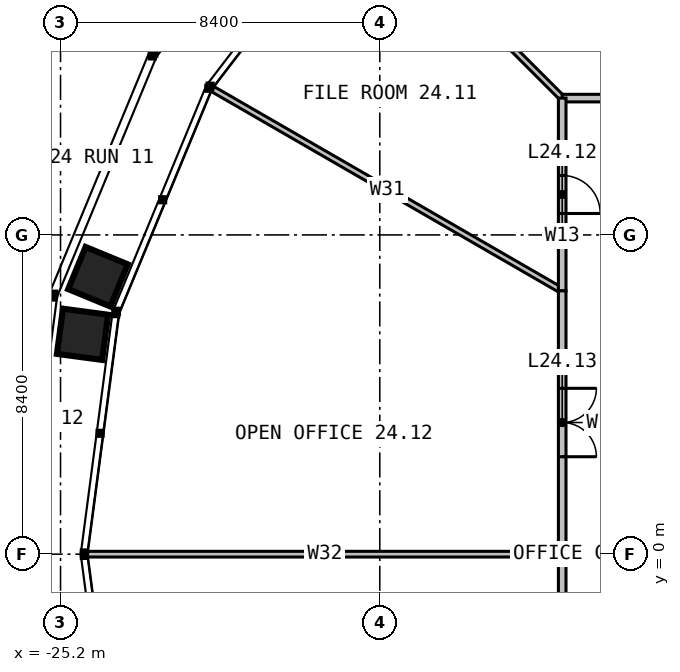
"""IFC4 building model, lengths in metres.
Left out: names, types, materials, properties, quantities, classifications, styles, units other than length and angle.
Written with IfcOpenShell. Run it as: python <this file> out.ifc"""

import sys

from ifc_helpers import new_model, si_unit, direction, frame, frame_2d, origin, place, context, subcontext, project, spatial, rectangle, extrude, element, fill, save


model = new_model("IFC4")
c1 = context("Model", 3, precision=1e-05, world=origin(), true_north=direction((0.0, 1.0)))
c2 = subcontext(c1, "Body", "Model", "MODEL_VIEW")
j1 = project(units=[si_unit("LENGTHUNIT", "METRE"), si_unit("PLANEANGLEUNIT", "RADIAN")], contexts=[c1])
p1 = place(None, origin())
s1 = spatial("IfcSite", under=j1, at=p1, CompositionType="ELEMENT")
p2 = place(p1, origin())
s2 = spatial("IfcBuilding", under=s1, at=p2, CompositionType="ELEMENT")
p3 = place(p2, frame((0.0, 0.0, 102.0)))
s3 = spatial("IfcBuildingStorey", under=s2, at=p3, CompositionType="ELEMENT", Elevation=102.0)
p4 = place(p3, frame((-6.928, 12.0, 0.0), z_axis=(0.0, 0.0, 1.0), x_axis=(-0.500002090115, 0.866024197053, 0.0)))
e1 = element("IfcWall", 1, at=p4, inside=s3, PredefinedType="PARTITIONING", context=c2, shape_type="SweptSolid", body=[
    extrude(rectangle(XDim=10.631, YDim=0.15, at=frame_2d((5.315, 0.0))), origin(), (0.0, 0.0, 1.0), 2.79),
])
p5 = place(p3, frame((-12.0, 12.0, 0.0), z_axis=(0.0, 0.0, 1.0), x_axis=(-0.707106781187, 0.707106781187, 0.0)))
e2 = element("IfcWall", 2, at=p5, inside=s3, PredefinedType="PARTITIONING", context=c2, shape_type="SweptSolid", body=[
    extrude(rectangle(XDim=7.517, YDim=0.15, at=frame_2d((3.758, 0.0))), origin(), (0.0, 0.0, 1.0), 2.79),
])
p6 = place(p3, frame((-12.0, 6.928, 0.0), z_axis=(0.0, 0.0, 1.0), x_axis=(-0.866024197053, 0.500002090115, 0.0)))
e3 = element("IfcWall", 3, at=p6, inside=s3, PredefinedType="PARTITIONING", context=c2, shape_type="SweptSolid", body=[
    extrude(rectangle(XDim=10.631, YDim=0.15, at=frame_2d((5.315, 0.0))), origin(), (0.0, 0.0, 1.0), 2.79),
])
p7 = place(p3, frame((-12.0, 0.0, 0.0), z_axis=(0.0, 0.0, 1.0), x_axis=(-1.0, 0.0, 0.0)))
e4 = element("IfcWall", 4, at=p7, inside=s3, PredefinedType="PARTITIONING", context=c2, shape_type="SweptSolid", body=[
    extrude(rectangle(XDim=12.487, YDim=0.15, at=frame_2d((6.244, 0.0))), origin(), (0.0, 0.0, 1.0), 2.79),
])
p8 = place(p3, frame((-6.928, 12.0, 0.0), z_axis=(0.0, 0.0, 1.0), x_axis=(-1.0, 0.0, 0.0)))
e5 = element("IfcWall", 5, at=p8, inside=s3, PredefinedType="PARTITIONING", context=c2, shape_type="SweptSolid", body=[
    extrude(rectangle(XDim=5.072, YDim=0.2, at=frame_2d((2.536, 0.0))), origin(), (0.0, 0.0, 1.0), 3.8),
])
p9 = place(p8, frame((2.036, 0.0, 0.0)))
e6 = element("IfcOpeningElement", 6, at=p9, cuts=e5, PredefinedType="OPENING", context=c2, shape_type="SweptSolid", body=[
    extrude(rectangle(XDim=1.0, YDim=2.2, at=frame_2d((0.5, 1.1))), frame((0.0, 0.11, 0.0), z_axis=(0.0, -1.0, 0.0), x_axis=(1.0, 0.0, 0.0)), (0.0, 0.0, 1.0), 0.22),
])
p10 = place(p3, frame((-12.0, 12.0, 0.0), z_axis=(0.0, 0.0, 1.0), x_axis=(0.0, -1.0, 0.0)))
e7 = element("IfcWall", 7, at=p10, inside=s3, PredefinedType="PARTITIONING", context=c2, shape_type="SweptSolid", body=[
    extrude(rectangle(XDim=5.072, YDim=0.2, at=frame_2d((2.536, 0.0))), origin(), (0.0, 0.0, 1.0), 3.8),
])
p11 = place(p10, frame((2.036, 0.0, 0.0)))
e8 = element("IfcOpeningElement", 8, at=p11, cuts=e7, PredefinedType="OPENING", context=c2, shape_type="SweptSolid", body=[
    extrude(rectangle(XDim=1.0, YDim=2.2, at=frame_2d((0.5, 1.1))), frame((0.0, 0.11, 0.0), z_axis=(0.0, -1.0, 0.0), x_axis=(1.0, 0.0, 0.0)), (0.0, 0.0, 1.0), 0.22),
])
p12 = place(p3, frame((-12.0, 6.928, 0.0), z_axis=(0.0, 0.0, 1.0), x_axis=(0.0, -1.0, 0.0)))
e9 = element("IfcWall", 9, at=p12, inside=s3, PredefinedType="PARTITIONING", context=c2, shape_type="SweptSolid", body=[
    extrude(rectangle(XDim=6.928, YDim=0.2, at=frame_2d((3.464, 0.0))), origin(), (0.0, 0.0, 1.0), 3.8),
])
p13 = place(p12, frame((2.564, 0.0, 0.0)))
e10 = element("IfcOpeningElement", 10, at=p13, cuts=e9, PredefinedType="OPENING", context=c2, shape_type="SweptSolid", body=[
    extrude(rectangle(XDim=1.8, YDim=2.2, at=frame_2d((0.9, 1.1))), frame((0.0, 0.11, 0.0), z_axis=(0.0, -1.0, 0.0), x_axis=(1.0, 0.0, 0.0)), (0.0, 0.0, 1.0), 0.22),
])
p14 = place(p3, frame((-12.0, 0.0, 0.0), z_axis=(0.0, 0.0, 1.0), x_axis=(0.0, -1.0, 0.0)))
e11 = element("IfcWall", 11, at=p14, inside=s3, PredefinedType="PARTITIONING", context=c2, shape_type="SweptSolid", body=[
    extrude(rectangle(XDim=6.928, YDim=0.2, at=frame_2d((3.464, 0.0))), origin(), (0.0, 0.0, 1.0), 3.8),
])
p15 = place(p14, frame((2.564, 0.0, 0.0)))
e12 = element("IfcOpeningElement", 12, at=p15, cuts=e11, PredefinedType="OPENING", context=c2, shape_type="SweptSolid", body=[
    extrude(rectangle(XDim=1.8, YDim=2.2, at=frame_2d((0.9, 1.1))), frame((0.0, 0.11, 0.0), z_axis=(0.0, -1.0, 0.0), x_axis=(1.0, 0.0, 0.0)), (0.0, 0.0, 1.0), 0.22),
])
p16 = place(p11, origin())
e13 = element("IfcDoor", 13, at=p16, inside=s3, OperationType="SINGLE_SWING_RIGHT", PredefinedType="DOOR", context=c2, shape_type="SweptSolid", body=[
    extrude(rectangle(XDim=1.0, YDim=2.2, at=frame_2d((0.5, 1.1))), frame((0.0, 0.025, 0.0), z_axis=(0.0, -1.0, 0.0), x_axis=(1.0, 0.0, 0.0)), (0.0, 0.0, 1.0), 0.05),
])
fill(e8, e13)
p17 = place(p13, origin())
e14 = element("IfcDoor", 14, at=p17, inside=s3, OperationType="DOUBLE_DOOR_SINGLE_SWING", PredefinedType="DOOR", context=c2, shape_type="SweptSolid", body=[
    extrude(rectangle(XDim=1.8, YDim=2.2, at=frame_2d((0.9, 1.1))), frame((0.0, 0.025, 0.0), z_axis=(0.0, -1.0, 0.0), x_axis=(1.0, 0.0, 0.0)), (0.0, 0.0, 1.0), 0.05),
])
fill(e10, e14)
save(model, sys.argv[1])
